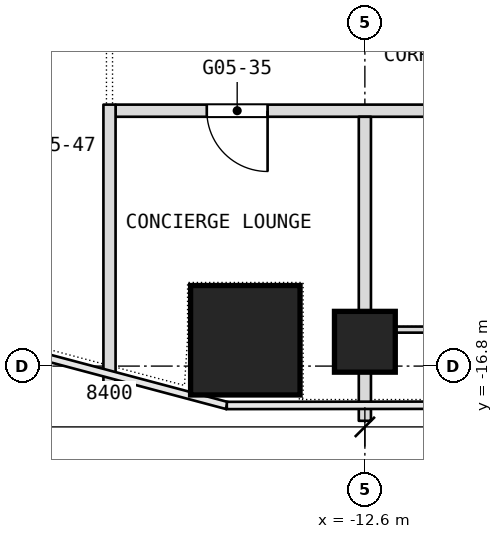
"""IFC4 building model, lengths in metres.
Left out: names, types, materials, properties, quantities, classifications, styles, units other than length and angle.
Written with IfcOpenShell. Run it as: python <this file> out.ifc"""

import sys

from ifc_helpers import new_model, si_unit, direction, frame, frame_2d, origin, origin_2d, place, context, subcontext, project, spatial, rectangle, extrude, element, fill, save


model = new_model("IFC4")
c1 = context("Model", 3, precision=1e-05, world=origin(), true_north=direction((0.0, 1.0)))
c2 = subcontext(c1, "Body", "Model", "MODEL_VIEW")
j1 = project(units=[si_unit("LENGTHUNIT", "METRE"), si_unit("PLANEANGLEUNIT", "RADIAN")], contexts=[c1])
p1 = place(None, origin())
s1 = spatial("IfcSite", under=j1, at=p1, CompositionType="ELEMENT")
p2 = place(p1, origin())
s2 = spatial("IfcBuilding", under=s1, at=p2, CompositionType="ELEMENT")
p3 = place(p2, frame((0.0, 0.0, 65.3)))
s3 = spatial("IfcBuildingStorey", under=s2, at=p3, CompositionType="ELEMENT", Elevation=65.3)
p4 = place(p3, frame((-14.566, -16.375, 0.0), z_axis=(0.0, 0.0, 1.0), x_axis=(1.0, 0.0, 0.0)))
e1 = element("IfcColumn", 1, at=p4, inside=s3, PredefinedType="COLUMN", context=c2, shape_type="SweptSolid", body=[
    extrude(rectangle(XDim=1.8, YDim=1.8, at=origin_2d()), origin(), (0.0, 0.0, 1.0), 3.6),
])
p5 = place(p3, frame((-12.6, -16.4, 0.0), z_axis=(0.0, 0.0, 1.0), x_axis=(1.0, 0.0, 0.0)))
e2 = element("IfcColumn", 2, at=p5, inside=s3, PredefinedType="COLUMN", context=c2, shape_type="SweptSolid", body=[
    extrude(rectangle(XDim=1.0, YDim=1.0, at=origin_2d()), origin(), (0.0, 0.0, 1.0), 3.6),
])
p6 = place(p3, frame((-12.5, -16.2, 0.0), z_axis=(0.0, 0.0, 1.0), x_axis=(1.0, 0.0, 0.0)))
e3 = element("IfcWall", 3, at=p6, inside=s3, PredefinedType="PARTITIONING", context=c2, shape_type="SweptSolid", body=[
    extrude(rectangle(XDim=3.55, YDim=0.1, at=frame_2d((1.775, 0.0))), origin(), (0.0, 0.0, 1.0), 2.94),
])
p7 = place(p3, frame((-16.7, -12.6, 0.0), z_axis=(0.0, 0.0, 1.0), x_axis=(1.0, 0.0, 0.0)))
e4 = element("IfcWall", 4, at=p7, inside=s3, PredefinedType="PARTITIONING", context=c2, shape_type="SweptSolid", body=[
    extrude(rectangle(XDim=33.4, YDim=0.2, at=frame_2d((16.7, 0.0))), origin(), (0.0, 0.0, 1.0), 3.34),
])
p8 = place(p7, frame((1.5, 0.0, 0.0)))
e5 = element("IfcOpeningElement", 5, at=p8, cuts=e4, PredefinedType="OPENING", context=c2, shape_type="SweptSolid", body=[
    extrude(rectangle(XDim=1.0, YDim=2.1, at=frame_2d((0.5, 1.05))), frame((0.0, 0.1, 0.0), z_axis=(0.0, -1.0, 0.0), x_axis=(1.0, 0.0, 0.0)), (0.0, 0.0, 1.0), 0.2),
])
p9 = place(p7, frame((7.8, 0.0, 0.0)))
e6 = element("IfcOpeningElement", 6, at=p9, cuts=e4, PredefinedType="OPENING", context=c2, shape_type="SweptSolid", body=[
    extrude(rectangle(XDim=1.1, YDim=2.1, at=frame_2d((0.55, 1.05))), frame((0.0, 0.1, 0.0), z_axis=(0.0, -1.0, 0.0), x_axis=(1.0, 0.0, 0.0)), (0.0, 0.0, 1.0), 0.2),
])
p10 = place(p7, frame((12.9, 0.0, 0.0)))
e7 = element("IfcOpeningElement", 7, at=p10, cuts=e4, PredefinedType="OPENING", context=c2, shape_type="SweptSolid", body=[
    extrude(rectangle(XDim=1.0, YDim=2.1, at=frame_2d((0.5, 1.05))), frame((0.0, 0.1, 0.0), z_axis=(0.0, -1.0, 0.0), x_axis=(1.0, 0.0, 0.0)), (0.0, 0.0, 1.0), 0.2),
])
p11 = place(p7, frame((19.5, 0.0, 0.0)))
e8 = element("IfcOpeningElement", 8, at=p11, cuts=e4, PredefinedType="OPENING", context=c2, shape_type="SweptSolid", body=[
    extrude(rectangle(XDim=1.0, YDim=2.1, at=frame_2d((0.5, 1.05))), frame((0.0, 0.1, 0.0), z_axis=(0.0, -1.0, 0.0), x_axis=(1.0, 0.0, 0.0)), (0.0, 0.0, 1.0), 0.2),
])
p12 = place(p7, frame((23.7, 0.0, 0.0)))
e9 = element("IfcOpeningElement", 9, at=p12, cuts=e4, PredefinedType="OPENING", context=c2, shape_type="SweptSolid", body=[
    extrude(rectangle(XDim=1.0, YDim=2.1, at=frame_2d((0.5, 1.05))), frame((0.0, 0.1, 0.0), z_axis=(0.0, -1.0, 0.0), x_axis=(1.0, 0.0, 0.0)), (0.0, 0.0, 1.0), 0.2),
])
p13 = place(p7, frame((25.5, 0.0, 0.0)))
e10 = element("IfcOpeningElement", 10, at=p13, cuts=e4, PredefinedType="OPENING", context=c2, shape_type="SweptSolid", body=[
    extrude(rectangle(XDim=1.0, YDim=2.1, at=frame_2d((0.5, 1.05))), frame((0.0, 0.1, 0.0), z_axis=(0.0, -1.0, 0.0), x_axis=(1.0, 0.0, 0.0)), (0.0, 0.0, 1.0), 0.2),
])
p14 = place(p7, frame((30.083, 0.0, 0.0)))
e11 = element("IfcOpeningElement", 11, at=p14, cuts=e4, PredefinedType="OPENING", context=c2, shape_type="SweptSolid", body=[
    extrude(rectangle(XDim=1.0, YDim=2.1, at=frame_2d((0.5, 1.05))), frame((0.0, 0.1, 0.0), z_axis=(0.0, -1.0, 0.0), x_axis=(1.0, 0.0, 0.0)), (0.0, 0.0, 1.0), 0.2),
])
p15 = place(p3, frame((-12.6, -17.7, 0.0), z_axis=(0.0, 0.0, 1.0), x_axis=(0.0, 1.0, 0.0)))
e12 = element("IfcWall", 12, at=p15, inside=s3, PredefinedType="PARTITIONING", context=c2, shape_type="SweptSolid", body=[
    extrude(rectangle(XDim=5.0, YDim=0.2, at=frame_2d((2.5, 0.0))), origin(), (0.0, 0.0, 1.0), 3.34),
])
p16 = place(p3, frame((-16.8, -17.143, 0.0), z_axis=(0.0, 0.0, 1.0), x_axis=(0.0, 1.0, 0.0)))
e13 = element("IfcWall", 13, at=p16, inside=s3, PredefinedType="PARTITIONING", context=c2, shape_type="SweptSolid", body=[
    extrude(rectangle(XDim=4.643, YDim=0.2, at=frame_2d((2.322, 0.0))), origin(), (0.0, 0.0, 1.0), 3.34),
])
p17 = place(p8, origin())
e14 = element("IfcDoor", 14, at=p17, inside=s3, OperationType="SINGLE_SWING_RIGHT", PredefinedType="DOOR", context=c2, shape_type="SweptSolid", body=[
    extrude(rectangle(XDim=1.0, YDim=2.1, at=frame_2d((0.5, 1.05))), frame((0.0, 0.025, 0.0), z_axis=(0.0, -1.0, 0.0), x_axis=(1.0, 0.0, 0.0)), (0.0, 0.0, 1.0), 0.05),
])
fill(e5, e14)
save(model, sys.argv[1])
